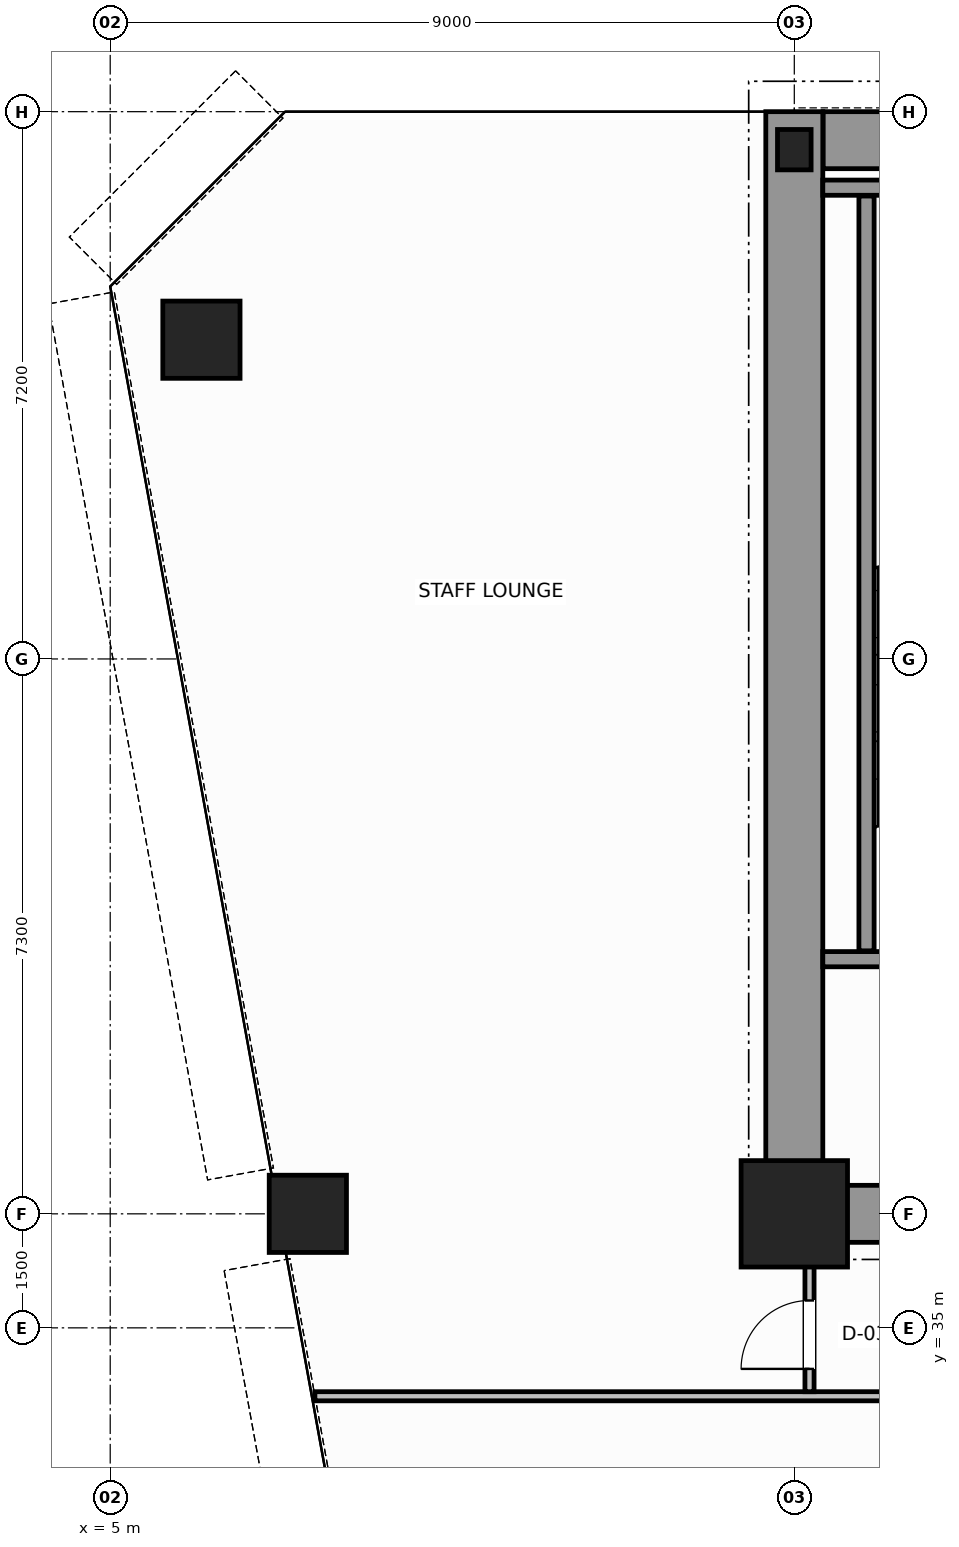
"""IFC4 building model, lengths in metres.
Left out: names, types, materials, properties, quantities, classifications, styles, units other than length and angle.
Written with IfcOpenShell. Run it as: python <this file> out.ifc"""

import sys

from ifc_helpers import new_model, si_unit, direction, frame, frame_2d, origin, origin_2d, place, context, subcontext, project, spatial, rectangle, hollow_circle, i_section, extrude, source, transform, mapped, element, fill, save


model = new_model("IFC4")
c1 = context("Model", 3, precision=1e-05, world=origin(), true_north=direction((0.0, 1.0)))
c2 = subcontext(c1, "Body", "Model", "MODEL_VIEW")
j1 = project(units=[si_unit("LENGTHUNIT", "METRE"), si_unit("PLANEANGLEUNIT", "RADIAN")], contexts=[c1])
p1 = place(None, origin())
s1 = spatial("IfcSite", under=j1, at=p1, CompositionType="ELEMENT")
p2 = place(p1, origin())
s2 = spatial("IfcBuilding", under=s1, at=p2, CompositionType="ELEMENT")
p3 = place(p2, frame((0.0, 0.0, 130.0)))
s3 = spatial("IfcBuildingStorey", under=s2, at=p3, CompositionType="ELEMENT", Elevation=130.0)
m1 = source(origin(), c2, "Body", "SweptSolid", [
    extrude(rectangle(XDim=1.4, YDim=1.4, at=origin_2d()), origin(), (0.0, 0.0, 1.0), 3.8),
])
p4 = place(p3, frame((14.0, 36.5, 0.0), z_axis=(0.0, 0.0, 1.0), x_axis=(1.0, 0.0, 0.0)))
e1 = element("IfcColumn", 1, at=p4, inside=s3, PredefinedType="COLUMN", context=c2, shape_type="MappedRepresentation", body=[
    mapped(m1, transform((0.0, 0.0, 0.0), scale=1.0)),
])
m2 = source(origin(), c2, "Body", "SweptSolid", [
    extrude(i_section(OverallWidth=0.442, OverallDepth=0.531, WebThickness=0.065, FlangeThickness=0.076, FilletRadius=0.015, at=origin_2d()), origin(), (0.0, 0.0, 1.0), 3.8),
])
p5 = place(p3, frame((14.0, 50.5, 0.0), z_axis=(0.0, 0.0, 1.0), x_axis=(1.0, 0.0, 0.0)))
e2 = element("IfcColumn", 2, at=p5, inside=s3, PredefinedType="COLUMN", context=c2, shape_type="MappedRepresentation", body=[
    mapped(m2, transform((0.0, 0.0, 0.0), scale=1.0)),
])
m3 = source(origin(), c2, "Body", "SweptSolid", [
    extrude(hollow_circle(Radius=0.508, WallThickness=0.045, at=origin_2d()), origin(), (0.0, 0.0, 1.0), 3.8),
])
for number, where, z_axis, x_axis in (
    (3, (6.2, 48.0, 0.0), (0.0, 0.0, 1.0), (1.0, 0.0, 0.0)),
    (4, (7.6, 36.5, 0.0), (0.0, 0.0, 1.0), (1.0, 0.0, 0.0)),
):
    element("IfcColumn", number, at=place(p3, frame(where, z_axis=z_axis, x_axis=x_axis)), inside=s3, PredefinedType="COLUMN", context=c2, shape_type="MappedRepresentation", body=[
        mapped(m3, transform((0.0, 0.0, 0.0), scale=1.0)),
    ])
p6 = place(p3, frame((14.379, 50.625, 0.0), z_axis=(0.0, 0.0, 1.0), x_axis=(1.0, 0.0, 0.0)))
e5 = element("IfcWall", 5, at=p6, inside=s3, PredefinedType="SHEAR", context=c2, shape_type="SweptSolid", body=[
    extrude(rectangle(XDim=19.619, YDim=0.75, at=frame_2d((9.81, 0.0))), origin(), (0.0, 0.0, 1.0), 3.8),
])
p7 = place(p3, frame((14.0, 36.5, 0.0), z_axis=(0.0, 0.0, 1.0), x_axis=(0.0, 1.0, 0.0)))
e6 = element("IfcWall", 6, at=p7, inside=s3, PredefinedType="SHEAR", context=c2, shape_type="SweptSolid", body=[
    extrude(rectangle(XDim=14.5, YDim=0.75, at=frame_2d((7.25, 0.0))), origin(), (0.0, 0.0, 1.0), 3.8),
])
p8 = place(p3, frame((14.395, 36.5, 0.0), z_axis=(0.0, 0.0, 1.0), x_axis=(1.0, 0.0, 0.0)))
e7 = element("IfcWall", 7, at=p8, inside=s3, PredefinedType="SHEAR", context=c2, shape_type="SweptSolid", body=[
    extrude(rectangle(XDim=3.805, YDim=0.75, at=frame_2d((1.902, 0.0))), origin(), (0.0, 0.0, 1.0), 2.38),
])
p9 = place(p3, frame((14.375, 39.85, 0.0), z_axis=(0.0, 0.0, 1.0), x_axis=(1.0, 0.0, 0.0)))
e8 = element("IfcWall", 8, at=p9, inside=s3, PredefinedType="SOLIDWALL", context=c2, shape_type="SweptSolid", body=[
    extrude(rectangle(XDim=4.225, YDim=0.2, at=frame_2d((2.113, 0.0))), origin(), (0.0, 0.0, 1.0), 3.8),
])
p10 = place(p9, frame((1.8, 0.0, 0.0)))
e9 = element("IfcOpeningElement", 9, at=p10, cuts=e8, PredefinedType="OPENING", context=c2, shape_type="SweptSolid", body=[
    extrude(rectangle(XDim=1.1, YDim=2.15, at=frame_2d((0.55, 1.075))), frame((0.0, 0.11, 0.0), z_axis=(0.0, -1.0, 0.0), x_axis=(1.0, 0.0, 0.0)), (0.0, 0.0, 1.0), 0.22),
])
p11 = place(p3, frame((14.375, 50.0, 0.0), z_axis=(0.0, 0.0, 1.0), x_axis=(1.0, 0.0, 0.0)))
e10 = element("IfcWall", 10, at=p11, inside=s3, PredefinedType="SOLIDWALL", context=c2, shape_type="SweptSolid", body=[
    extrude(rectangle(XDim=4.225, YDim=0.2, at=frame_2d((2.113, 0.0))), origin(), (0.0, 0.0, 1.0), 3.8),
])
p12 = place(p3, frame((14.95, 39.96, 0.0), z_axis=(0.0, 0.0, 1.0), x_axis=(0.0, 1.0, 0.0)))
e11 = element("IfcWall", 11, at=p12, inside=s3, PredefinedType="SOLIDWALL", context=c2, shape_type="SweptSolid", body=[
    extrude(rectangle(XDim=9.93, YDim=0.2, at=frame_2d((4.965, 0.0))), origin(), (0.0, 0.0, 1.0), 3.8),
])
p13 = place(p3, frame((7.693, 34.1, 0.0), z_axis=(0.0, 0.0, 1.0), x_axis=(1.0, 0.0, 0.0)))
e12 = element("IfcWall", 12, at=p13, inside=s3, PredefinedType="PARTITIONING", context=c2, shape_type="SweptSolid", body=[
    extrude(rectangle(XDim=10.847, YDim=0.12, at=frame_2d((5.424, 0.0))), origin(), (0.0, 0.0, 1.0), 3.58),
])
p14 = place(p3, frame((14.2, 34.16, 0.0), z_axis=(0.0, 0.0, 1.0), x_axis=(0.0, 1.0, 0.0)))
e13 = element("IfcWall", 13, at=p14, inside=s3, PredefinedType="PARTITIONING", context=c2, shape_type="SweptSolid", body=[
    extrude(rectangle(XDim=2.28, YDim=0.12, at=frame_2d((1.14, 0.0))), origin(), (0.0, 0.0, 1.0), 3.58),
])
p15 = place(p14, frame((0.3, 0.0, 0.0)))
e14 = element("IfcOpeningElement", 14, at=p15, cuts=e13, PredefinedType="OPENING", context=c2, shape_type="SweptSolid", body=[
    extrude(rectangle(XDim=0.9, YDim=2.15, at=frame_2d((0.45, 1.075))), frame((0.0, 0.07, 0.0), z_axis=(0.0, -1.0, 0.0), x_axis=(1.0, 0.0, 0.0)), (0.0, 0.0, 1.0), 0.14),
])
m4 = source(origin(), c2, "Body", "SweptSolid", [
    extrude(rectangle(XDim=0.9, YDim=2.15, at=frame_2d((0.45, 1.075))), frame((0.0, 0.025, 0.0), z_axis=(0.0, -1.0, 0.0), x_axis=(1.0, 0.0, 0.0)), (0.0, 0.0, 1.0), 0.05),
])
p16 = place(p15, origin())
e15 = element("IfcDoor", 15, at=p16, inside=s3, OperationType="SINGLE_SWING_LEFT", PredefinedType="DOOR", context=c2, shape_type="MappedRepresentation", body=[
    mapped(m4, transform((0.0, 0.0, 0.0), scale=1.0)),
])
fill(e14, e15)
save(model, sys.argv[1])
